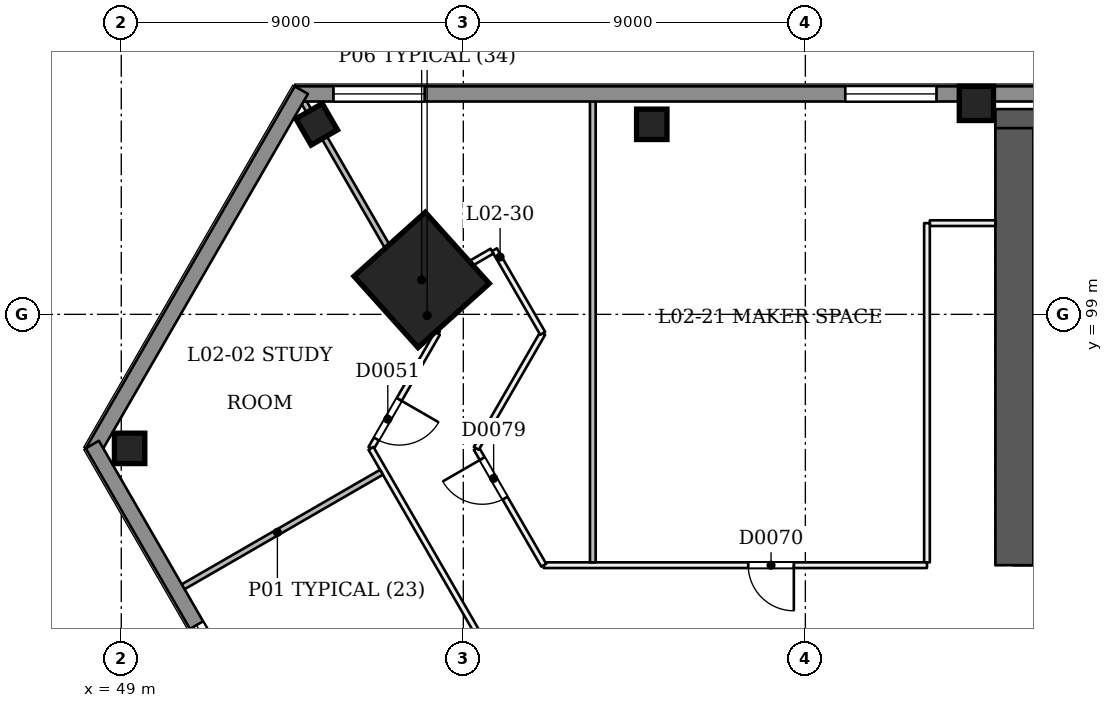
"""IFC4 building model, lengths in metres.
Left out: names, types, materials, properties, quantities, classifications, styles, units other than length and angle.
Written with IfcOpenShell. Run it as: python <this file> out.ifc"""

import sys

from ifc_helpers import new_model, si_unit, direction, frame, frame_2d, origin, origin_2d, place, context, subcontext, project, spatial, rectangle, extrude, element, fill, save


model = new_model("IFC4")
c1 = context("Model", 3, precision=1e-05, world=origin(), true_north=direction((0.0, 1.0)))
c2 = subcontext(c1, "Body", "Model", "MODEL_VIEW")
j1 = project(units=[si_unit("LENGTHUNIT", "METRE"), si_unit("PLANEANGLEUNIT", "RADIAN")], contexts=[c1])
p1 = place(None, origin())
s1 = spatial("IfcSite", under=j1, at=p1, CompositionType="ELEMENT")
p2 = place(p1, origin())
s2 = spatial("IfcBuilding", under=s1, at=p2, CompositionType="ELEMENT")
p3 = place(p2, frame((0.0, 0.0, 13.5)))
s3 = spatial("IfcBuildingStorey", under=s2, at=p3, CompositionType="ELEMENT", Elevation=13.5)
p4 = place(p3, frame((72.5, 92.9, 0.0), z_axis=(0.0, 0.0, 1.0), x_axis=(1.0, 0.0, 0.0)))
e1 = element("IfcWall", 1, at=p4, inside=s3, PredefinedType="SHEAR", context=c2, shape_type="SweptSolid", body=[
    extrude(rectangle(XDim=25.5, YDim=1.0, at=frame_2d((12.75, 0.0))), origin(), (0.0, 0.0, 1.0), 4.5),
])
p5 = place(p4, frame((1.3, 0.0, 0.0)))
e2 = element("IfcOpeningElement", 2, at=p5, cuts=e1, PredefinedType="OPENING", context=c2, shape_type="SweptSolid", body=[
    extrude(rectangle(XDim=1.2, YDim=2.1, at=frame_2d((0.6, 1.05))), frame((0.0, 0.51, 0.0), z_axis=(0.0, -1.0, 0.0), x_axis=(1.0, 0.0, 0.0)), (0.0, 0.0, 1.0), 1.021),
])
p6 = place(p4, frame((3.5, 0.0, 0.0)))
e3 = element("IfcOpeningElement", 3, at=p6, cuts=e1, PredefinedType="OPENING", context=c2, shape_type="SweptSolid", body=[
    extrude(rectangle(XDim=1.2, YDim=2.1, at=frame_2d((0.6, 1.05))), frame((0.0, 0.51, 0.0), z_axis=(0.0, -1.0, 0.0), x_axis=(1.0, 0.0, 0.0)), (0.0, 0.0, 1.0), 1.021),
])
p7 = place(p4, frame((13.5, 0.0, 0.0)))
e4 = element("IfcOpeningElement", 4, at=p7, cuts=e1, PredefinedType="OPENING", context=c2, shape_type="SweptSolid", body=[
    extrude(rectangle(XDim=1.2, YDim=2.1, at=frame_2d((0.6, 1.05))), frame((0.0, 0.51, 0.0), z_axis=(0.0, -1.0, 0.0), x_axis=(1.0, 0.0, 0.0)), (0.0, 0.0, 1.0), 1.021),
])
p8 = place(p4, frame((16.163, 0.0, 0.0)))
e5 = element("IfcOpeningElement", 5, at=p8, cuts=e1, PredefinedType="OPENING", context=c2, shape_type="SweptSolid", body=[
    extrude(rectangle(XDim=1.0, YDim=2.1, at=frame_2d((0.5, 1.05))), frame((0.0, 0.51, 0.0), z_axis=(0.0, -1.0, 0.0), x_axis=(1.0, 0.0, 0.0)), (0.0, 0.0, 1.0), 1.021),
])
p9 = place(p4, frame((18.95, 0.0, 0.0)))
e6 = element("IfcOpeningElement", 6, at=p9, cuts=e1, PredefinedType="OPENING", context=c2, shape_type="SweptSolid", body=[
    extrude(rectangle(XDim=1.0, YDim=2.1, at=frame_2d((0.5, 1.05))), frame((0.0, 0.51, 0.0), z_axis=(0.0, -1.0, 0.0), x_axis=(1.0, 0.0, 0.0)), (0.0, 0.0, 1.0), 1.021),
])
p10 = place(p4, frame((22.137, 0.0, 0.0)))
e7 = element("IfcOpeningElement", 7, at=p10, cuts=e1, PredefinedType="OPENING", context=c2, shape_type="SweptSolid", body=[
    extrude(rectangle(XDim=1.0, YDim=2.1, at=frame_2d((0.5, 1.05))), frame((0.0, 0.51, 0.0), z_axis=(0.0, -1.0, 0.0), x_axis=(1.0, 0.0, 0.0)), (0.0, 0.0, 1.0), 1.021),
])
p11 = place(p3, frame((97.5, 103.9, 0.0), z_axis=(0.0, 0.0, 1.0), x_axis=(-1.0, 0.0, 0.0)))
e8 = element("IfcWall", 8, at=p11, inside=s3, PredefinedType="SHEAR", context=c2, shape_type="SweptSolid", body=[
    extrude(rectangle(XDim=25.5, YDim=1.0, at=frame_2d((12.75, 0.0))), origin(), (0.0, 0.0, 1.0), 4.5),
])
p12 = place(p3, frame((72.5, 103.9, 0.0), z_axis=(0.0, 0.0, 1.0), x_axis=(0.0, -1.0, 0.0)))
e9 = element("IfcWall", 9, at=p12, inside=s3, PredefinedType="SHEAR", context=c2, shape_type="SweptSolid", body=[
    extrude(rectangle(XDim=11.5, YDim=1.0, at=frame_2d((5.75, 0.0))), origin(), (0.0, 0.0, 1.0), 4.5),
])
p13 = place(p3, frame((56.869, 99.895, 0.0), z_axis=(0.028361930921, 0.009273212596, 0.999554705057), x_axis=(-0.866194817713, 0.499308230352, 0.01994564791)))
e10 = element("IfcColumn", 10, at=p13, inside=s3, PredefinedType="COLUMN", context=c2, shape_type="SweptSolid", body=[
    extrude(rectangle(XDim=2.52, YDim=2.52, at=origin_2d()), origin(), (0.0, 0.0, 1.0), 4.502),
])
p14 = place(p3, frame((71.5, 104.55, 0.0), z_axis=(0.0, 0.0, 1.0), x_axis=(1.0, 0.0, 0.0)))
e11 = element("IfcColumn", 11, at=p14, inside=s3, PredefinedType="COLUMN", context=c2, shape_type="SweptSolid", body=[
    extrude(rectangle(XDim=0.9, YDim=0.9, at=origin_2d()), origin(), (0.0, 0.0, 1.0), 4.5),
])
for number, where, z_axis, x_axis in (
    (12, (62.959, 104.0, 0.0), (0.0, 0.0, 1.0), (1.0, 0.0, 0.0)),
    (13, (54.142, 104.0, 0.0), (0.0, 0.0, 1.0), (0.866, 0.5, 0.0)),
    (14, (49.219, 95.474, 0.0), (0.0, 0.0, 1.0), (1.0, 1.745e-08, 0.0)),
):
    element("IfcColumn", number, at=place(p3, frame(where, z_axis=z_axis, x_axis=x_axis)), inside=s3, PredefinedType="COLUMN", context=c2, shape_type="SweptSolid", body=[
        extrude(rectangle(XDim=0.8, YDim=0.8, at=origin_2d()), origin(), (0.0, 0.0, 1.0), 4.5),
    ])
p15 = place(p3, frame((56.778, 99.435, 0.0), z_axis=(0.0, 0.0, 1.0), x_axis=(0.500126914667, -0.865952117167, 0.0)))
e15 = element("IfcWall", 15, at=p15, inside=s3, PredefinedType="PARTITIONING", context=c2, shape_type="SweptSolid", body=[
    extrude(rectangle(XDim=1.08, YDim=0.15, at=frame_2d((0.54, 0.0))), origin(), (0.0, 0.0, 1.0), 4.05),
])
p16 = place(p3, frame((57.318, 98.5, 0.0), z_axis=(0.0, 0.0, 1.0), x_axis=(-0.500008701212, -0.866020380079, 0.0)))
e16 = element("IfcWall", 16, at=p16, inside=s3, PredefinedType="PARTITIONING", context=c2, shape_type="SweptSolid", body=[
    extrude(rectangle(XDim=3.495, YDim=0.15, at=frame_2d((1.747, 0.0))), origin(), (0.0, 0.0, 1.0), 4.05),
])
p17 = place(p16, frame((2.009, 0.0, 0.0)))
e17 = element("IfcOpeningElement", 17, at=p17, cuts=e16, PredefinedType="OPENING", context=c2, shape_type="SweptSolid", body=[
    extrude(rectangle(XDim=1.2, YDim=2.1, at=frame_2d((0.6, 1.05))), frame((0.0, 0.085, 0.0), z_axis=(0.0, -1.0, 0.0), x_axis=(1.0, 0.0, 0.0)), (0.0, 0.0, 1.0), 0.171),
])
p18 = place(p3, frame((55.57, 95.474, 0.0), z_axis=(0.0, 0.0, 1.0), x_axis=(0.500000085768, -0.866025354266, 0.0)))
e18 = element("IfcWall", 18, at=p18, inside=s3, PredefinedType="PARTITIONING", context=c2, shape_type="SweptSolid", body=[
    extrude(rectangle(XDim=55.365, YDim=0.15, at=frame_2d((27.682, 0.0))), origin(), (0.0, 0.0, 1.0), 4.05),
])
p19 = place(p18, frame((6.832, 0.0, 0.0)))
e19 = element("IfcOpeningElement", 19, at=p19, cuts=e18, PredefinedType="OPENING", context=c2, shape_type="SweptSolid", body=[
    extrude(rectangle(XDim=1.2, YDim=2.1, at=frame_2d((0.6, 1.05))), frame((0.0, 0.085, 0.0), z_axis=(0.0, -1.0, 0.0), x_axis=(1.0, 0.0, 0.0)), (0.0, 0.0, 1.0), 0.171),
])
p20 = place(p18, frame((14.626, 0.0, 0.0)))
e20 = element("IfcOpeningElement", 20, at=p20, cuts=e18, PredefinedType="OPENING", context=c2, shape_type="SweptSolid", body=[
    extrude(rectangle(XDim=0.9, YDim=2.1, at=frame_2d((0.45, 1.05))), frame((0.0, 0.085, 0.0), z_axis=(0.0, -1.0, 0.0), x_axis=(1.0, 0.0, 0.0)), (0.0, 0.0, 1.0), 0.171),
])
p21 = place(p18, frame((16.876, 0.0, 0.0)))
e21 = element("IfcOpeningElement", 21, at=p21, cuts=e18, PredefinedType="OPENING", context=c2, shape_type="SweptSolid", body=[
    extrude(rectangle(XDim=0.9, YDim=2.1, at=frame_2d((0.45, 1.05))), frame((0.0, 0.085, 0.0), z_axis=(0.0, -1.0, 0.0), x_axis=(1.0, 0.0, 0.0)), (0.0, 0.0, 1.0), 0.171),
])
p22 = place(p18, frame((24.832, 0.0, 0.0)))
e22 = element("IfcOpeningElement", 22, at=p22, cuts=e18, PredefinedType="OPENING", context=c2, shape_type="SweptSolid", body=[
    extrude(rectangle(XDim=1.2, YDim=2.1, at=frame_2d((0.6, 1.05))), frame((0.0, 0.085, 0.0), z_axis=(0.0, -1.0, 0.0), x_axis=(1.0, 0.0, 0.0)), (0.0, 0.0, 1.0), 0.171),
])
p23 = place(p18, frame((36.082, 0.0, 0.0)))
e23 = element("IfcOpeningElement", 23, at=p23, cuts=e18, PredefinedType="OPENING", context=c2, shape_type="SweptSolid", body=[
    extrude(rectangle(XDim=1.2, YDim=2.1, at=frame_2d((0.6, 1.05))), frame((0.0, 0.085, 0.0), z_axis=(0.0, -1.0, 0.0), x_axis=(1.0, 0.0, 0.0)), (0.0, 0.0, 1.0), 0.171),
])
p24 = place(p18, frame((45.082, 0.0, 0.0)))
e24 = element("IfcOpeningElement", 24, at=p24, cuts=e18, PredefinedType="OPENING", context=c2, shape_type="SweptSolid", body=[
    extrude(rectangle(XDim=1.2, YDim=2.1, at=frame_2d((0.6, 1.05))), frame((0.0, 0.085, 0.0), z_axis=(0.0, -1.0, 0.0), x_axis=(1.0, 0.0, 0.0)), (0.0, 0.0, 1.0), 0.171),
])
p25 = place(p18, frame((53.295, 0.0, 0.0)))
e25 = element("IfcOpeningElement", 25, at=p25, cuts=e18, PredefinedType="OPENING", context=c2, shape_type="SweptSolid", body=[
    extrude(rectangle(XDim=1.0, YDim=2.1, at=frame_2d((0.5, 1.05))), frame((0.0, 0.085, 0.0), z_axis=(0.0, -1.0, 0.0), x_axis=(1.0, 0.0, 0.0)), (0.0, 0.0, 1.0), 0.171),
])
p26 = place(p3, frame((72.0, 101.4, 0.0), z_axis=(0.0, 0.0, 1.0), x_axis=(-1.0, 0.0, 0.0)))
e26 = element("IfcWall", 26, at=p26, inside=s3, PredefinedType="PARTITIONING", context=c2, shape_type="SweptSolid", body=[
    extrude(rectangle(XDim=1.725, YDim=0.15, at=frame_2d((0.863, 0.0))), origin(), (0.0, 0.0, 1.0), 4.05),
])
p27 = place(p3, frame((70.2, 101.4, 0.0), z_axis=(0.0, 0.0, 1.0), x_axis=(0.0, -1.0, 0.0)))
e27 = element("IfcWall", 27, at=p27, inside=s3, PredefinedType="PARTITIONING", context=c2, shape_type="SweptSolid", body=[
    extrude(rectangle(XDim=8.925, YDim=0.15, at=frame_2d((4.462, 0.0))), origin(), (0.0, 0.0, 1.0), 4.05),
])
p28 = place(p3, frame((70.2, 92.4, 0.0), z_axis=(0.0, 0.0, 1.0), x_axis=(-1.0, 0.0, 0.0)))
e28 = element("IfcWall", 28, at=p28, inside=s3, PredefinedType="PARTITIONING", context=c2, shape_type="SweptSolid", body=[
    extrude(rectangle(XDim=10.084, YDim=0.15, at=frame_2d((5.042, 0.0))), origin(), (0.0, 0.0, 1.0), 4.05),
])
p29 = place(p28, frame((3.503, 0.0, 0.0)))
e29 = element("IfcOpeningElement", 29, at=p29, cuts=e28, PredefinedType="OPENING", context=c2, shape_type="SweptSolid", body=[
    extrude(rectangle(XDim=1.2, YDim=2.1, at=frame_2d((0.6, 1.05))), frame((0.0, 0.085, 0.0), z_axis=(0.0, -1.0, 0.0), x_axis=(1.0, 0.0, 0.0)), (0.0, 0.0, 1.0), 0.171),
])
p30 = place(p3, frame((60.116, 92.4, 0.0), z_axis=(0.0, 0.0, 1.0), x_axis=(-0.500008260065, 0.866020634781, 0.0)))
e30 = element("IfcWall", 30, at=p30, inside=s3, PredefinedType="PARTITIONING", context=c2, shape_type="SweptSolid", body=[
    extrude(rectangle(XDim=3.549, YDim=0.15, at=frame_2d((1.775, 0.0))), origin(), (0.0, 0.0, 1.0), 4.05),
])
p31 = place(p30, frame((2.037, 0.0, 0.0)))
e31 = element("IfcOpeningElement", 31, at=p31, cuts=e30, PredefinedType="OPENING", context=c2, shape_type="SweptSolid", body=[
    extrude(rectangle(XDim=1.2, YDim=2.1, at=frame_2d((0.6, 1.05))), frame((0.0, 0.085, 0.0), z_axis=(0.0, -1.0, 0.0), x_axis=(1.0, 0.0, 0.0)), (0.0, 0.0, 1.0), 0.171),
])
p32 = place(p3, frame((58.342, 95.474, 0.0), z_axis=(0.0, 0.0, 1.0), x_axis=(0.500008701212, 0.866020380079, 0.0)))
e32 = element("IfcWall", 32, at=p32, inside=s3, PredefinedType="PARTITIONING", context=c2, shape_type="SweptSolid", body=[
    extrude(rectangle(XDim=3.495, YDim=0.15, at=frame_2d((1.747, 0.0))), origin(), (0.0, 0.0, 1.0), 4.05),
])
p33 = place(p3, frame((60.089, 98.5, 0.0), z_axis=(0.0, 0.0, 1.0), x_axis=(-0.500035802948, 0.866004731956, 0.0)))
e33 = element("IfcWall", 33, at=p33, inside=s3, PredefinedType="PARTITIONING", context=c2, shape_type="SweptSolid", body=[
    extrude(rectangle(XDim=2.54, YDim=0.15, at=frame_2d((1.27, 0.0))), origin(), (0.0, 0.0, 1.0), 4.05),
])
p34 = place(p3, frame((58.754, 100.663, 0.0), z_axis=(0.0, 0.0, 1.0), x_axis=(-0.866017533419, -0.500013631625, 0.0)))
e34 = element("IfcWall", 34, at=p34, inside=s3, PredefinedType="PARTITIONING", context=c2, shape_type="SweptSolid", body=[
    extrude(rectangle(XDim=2.25, YDim=0.15, at=frame_2d((1.125, 0.0))), origin(), (0.0, 0.0, 1.0), 4.05),
])
p35 = place(p3, frame((50.369, 91.683, 0.0), z_axis=(0.0, 0.0, 1.0), x_axis=(0.866025537322, 0.499999768706, 0.0)))
e35 = element("IfcWall", 35, at=p35, inside=s3, PredefinedType="PARTITIONING", context=c2, shape_type="SweptSolid", body=[
    extrude(rectangle(XDim=6.325, YDim=0.15, at=frame_2d((3.163, 0.0))), origin(), (0.0, 0.0, 1.0), 4.05),
])
p36 = place(p3, frame((56.74, 99.5, 0.0), z_axis=(0.0, 0.0, 1.0), x_axis=(-0.500004896655, 0.866022576681, 0.0)))
e36 = element("IfcWall", 36, at=p36, inside=s3, PredefinedType="PARTITIONING", context=c2, shape_type="SweptSolid", body=[
    extrude(rectangle(XDim=6.235, YDim=0.15, at=frame_2d((3.118, 0.0))), origin(), (0.0, 0.0, 1.0), 4.05),
])
p37 = place(p3, frame((61.408, 104.9, 0.0), z_axis=(0.0, 0.0, 1.0), x_axis=(0.0, -1.0, 0.0)))
e37 = element("IfcWall", 37, at=p37, inside=s3, PredefinedType="PARTITIONING", context=c2, shape_type="SweptSolid", body=[
    extrude(rectangle(XDim=12.425, YDim=0.15, at=frame_2d((6.212, 0.0))), origin(), (0.0, 0.0, 1.0), 4.05),
])
p38 = place(p3, frame((53.565, 104.8, 0.0), z_axis=(0.0, 0.0, 1.0), x_axis=(1.0, 0.0, 0.0)))
e38 = element("IfcWall", 38, at=p38, inside=s3, PredefinedType="SOLIDWALL", context=c2, shape_type="SweptSolid", body=[
    extrude(rectangle(XDim=62.871, YDim=0.4, at=frame_2d((31.435, 0.0))), origin(), (0.0, 0.0, 1.0), 4.05),
])
p39 = place(p38, frame((59.452, 0.0, 0.9)))
e39 = element("IfcOpeningElement", 39, at=p39, cuts=e38, PredefinedType="OPENING", context=c2, shape_type="SweptSolid", body=[
    extrude(rectangle(XDim=2.4, YDim=1.5, at=frame_2d((1.2, 0.75))), frame((0.0, 0.21, 0.0), z_axis=(0.0, -1.0, 0.0), x_axis=(1.0, 0.0, 0.0)), (0.0, 0.0, 1.0), 0.421),
])
p40 = place(p38, frame((54.986, 0.0, 0.9)))
e40 = element("IfcOpeningElement", 40, at=p40, cuts=e38, PredefinedType="OPENING", context=c2, shape_type="SweptSolid", body=[
    extrude(rectangle(XDim=2.4, YDim=1.5, at=frame_2d((1.2, 0.75))), frame((0.0, 0.21, 0.0), z_axis=(0.0, -1.0, 0.0), x_axis=(1.0, 0.0, 0.0)), (0.0, 0.0, 1.0), 0.421),
])
p41 = place(p38, frame((45.986, 0.0, 0.9)))
e41 = element("IfcOpeningElement", 41, at=p41, cuts=e38, PredefinedType="OPENING", context=c2, shape_type="SweptSolid", body=[
    extrude(rectangle(XDim=2.4, YDim=1.5, at=frame_2d((1.2, 0.75))), frame((0.0, 0.21, 0.0), z_axis=(0.0, -1.0, 0.0), x_axis=(1.0, 0.0, 0.0)), (0.0, 0.0, 1.0), 0.421),
])
p42 = place(p38, frame((14.486, 0.0, 0.9)))
e42 = element("IfcOpeningElement", 42, at=p42, cuts=e38, PredefinedType="OPENING", context=c2, shape_type="SweptSolid", body=[
    extrude(rectangle(XDim=2.4, YDim=1.5, at=frame_2d((1.2, 0.75))), frame((0.0, 0.21, 0.0), z_axis=(0.0, -1.0, 0.0), x_axis=(1.0, 0.0, 0.0)), (0.0, 0.0, 1.0), 0.421),
])
p43 = place(p38, frame((1.018, 0.0, 0.9)))
e43 = element("IfcOpeningElement", 43, at=p43, cuts=e38, PredefinedType="OPENING", context=c2, shape_type="SweptSolid", body=[
    extrude(rectangle(XDim=2.4, YDim=1.5, at=frame_2d((1.2, 0.75))), frame((0.0, 0.21, 0.0), z_axis=(0.0, -1.0, 0.0), x_axis=(1.0, 0.0, 0.0)), (0.0, 0.0, 1.0), 0.421),
])
p44 = place(p3, frame((48.238, 95.374, 0.0), z_axis=(0.0, 0.0, 1.0), x_axis=(0.50000615651, 0.866021849293, 0.0)))
e44 = element("IfcWall", 44, at=p44, inside=s3, PredefinedType="SOLIDWALL", context=c2, shape_type="SweptSolid", body=[
    extrude(rectangle(XDim=11.0, YDim=0.4, at=frame_2d((5.5, 0.0))), origin(), (0.0, 0.0, 1.0), 4.05),
])
p45 = place(p3, frame((79.673, 41.126, 0.0), z_axis=(0.0, 0.0, 1.0), x_axis=(-0.499997306052, 0.866026959131, 0.0)))
e45 = element("IfcWall", 45, at=p45, inside=s3, PredefinedType="SOLIDWALL", context=c2, shape_type="SweptSolid", body=[
    extrude(rectangle(XDim=62.87, YDim=0.4, at=frame_2d((31.435, 0.0))), origin(), (0.0, 0.0, 1.0), 4.05),
])
p46 = place(p45, frame((54.986, 0.0, 0.9)))
e46 = element("IfcOpeningElement", 46, at=p46, cuts=e45, PredefinedType="OPENING", context=c2, shape_type="SweptSolid", body=[
    extrude(rectangle(XDim=2.4, YDim=1.5, at=frame_2d((1.2, 0.75))), frame((0.0, 0.21, 0.0), z_axis=(0.0, -1.0, 0.0), x_axis=(1.0, 0.0, 0.0)), (0.0, 0.0, 1.0), 0.421),
])
p47 = place(p45, frame((50.486, 0.0, 0.9)))
e47 = element("IfcOpeningElement", 47, at=p47, cuts=e45, PredefinedType="OPENING", context=c2, shape_type="SweptSolid", body=[
    extrude(rectangle(XDim=2.4, YDim=1.5, at=frame_2d((1.2, 0.75))), frame((0.0, 0.21, 0.0), z_axis=(0.0, -1.0, 0.0), x_axis=(1.0, 0.0, 0.0)), (0.0, 0.0, 1.0), 0.421),
])
p48 = place(p45, frame((45.986, 0.0, 0.9)))
e48 = element("IfcOpeningElement", 48, at=p48, cuts=e45, PredefinedType="OPENING", context=c2, shape_type="SweptSolid", body=[
    extrude(rectangle(XDim=2.4, YDim=1.5, at=frame_2d((1.2, 0.75))), frame((0.0, 0.21, 0.0), z_axis=(0.0, -1.0, 0.0), x_axis=(1.0, 0.0, 0.0)), (0.0, 0.0, 1.0), 0.421),
])
p49 = place(p45, frame((32.486, 0.0, 0.9)))
e49 = element("IfcOpeningElement", 49, at=p49, cuts=e45, PredefinedType="OPENING", context=c2, shape_type="SweptSolid", body=[
    extrude(rectangle(XDim=2.4, YDim=1.5, at=frame_2d((1.2, 0.75))), frame((0.0, 0.21, 0.0), z_axis=(0.0, -1.0, 0.0), x_axis=(1.0, 0.0, 0.0)), (0.0, 0.0, 1.0), 0.421),
])
p50 = place(p45, frame((27.986, 0.0, 0.9)))
e50 = element("IfcOpeningElement", 50, at=p50, cuts=e45, PredefinedType="OPENING", context=c2, shape_type="SweptSolid", body=[
    extrude(rectangle(XDim=2.4, YDim=1.5, at=frame_2d((1.2, 0.75))), frame((0.0, 0.21, 0.0), z_axis=(0.0, -1.0, 0.0), x_axis=(1.0, 0.0, 0.0)), (0.0, 0.0, 1.0), 0.421),
])
p51 = place(p45, frame((23.486, 0.0, 0.9)))
e51 = element("IfcOpeningElement", 51, at=p51, cuts=e45, PredefinedType="OPENING", context=c2, shape_type="SweptSolid", body=[
    extrude(rectangle(XDim=2.4, YDim=1.5, at=frame_2d((1.2, 0.75))), frame((0.0, 0.21, 0.0), z_axis=(0.0, -1.0, 0.0), x_axis=(1.0, 0.0, 0.0)), (0.0, 0.0, 1.0), 0.421),
])
p52 = place(p45, frame((18.986, 0.0, 0.9)))
e52 = element("IfcOpeningElement", 52, at=p52, cuts=e45, PredefinedType="OPENING", context=c2, shape_type="SweptSolid", body=[
    extrude(rectangle(XDim=2.4, YDim=1.5, at=frame_2d((1.2, 0.75))), frame((0.0, 0.21, 0.0), z_axis=(0.0, -1.0, 0.0), x_axis=(1.0, 0.0, 0.0)), (0.0, 0.0, 1.0), 0.421),
])
p53 = place(p45, frame((14.486, 0.0, 0.9)))
e53 = element("IfcOpeningElement", 53, at=p53, cuts=e45, PredefinedType="OPENING", context=c2, shape_type="SweptSolid", body=[
    extrude(rectangle(XDim=2.4, YDim=1.5, at=frame_2d((1.2, 0.75))), frame((0.0, 0.21, 0.0), z_axis=(0.0, -1.0, 0.0), x_axis=(1.0, 0.0, 0.0)), (0.0, 0.0, 1.0), 0.421),
])
p54 = place(p17, origin())
e54 = element("IfcDoor", 54, at=p54, inside=s3, OperationType="SINGLE_SWING_LEFT", PredefinedType="NOTDEFINED", context=c2, shape_type="SweptSolid", body=[
    extrude(rectangle(XDim=1.2, YDim=2.1, at=frame_2d((0.6, 1.05))), frame((0.0, 0.025, 0.0), z_axis=(0.0, -1.0, 0.0), x_axis=(1.0, 0.0, 0.0)), (0.0, 0.0, 1.0), 0.05),
])
fill(e17, e54)
p55 = place(p29, origin())
e55 = element("IfcDoor", 55, at=p55, inside=s3, OperationType="SINGLE_SWING_LEFT", PredefinedType="NOTDEFINED", context=c2, shape_type="SweptSolid", body=[
    extrude(rectangle(XDim=1.2, YDim=2.1, at=frame_2d((0.6, 1.05))), frame((0.0, 0.025, 0.0), z_axis=(0.0, -1.0, 0.0), x_axis=(1.0, 0.0, 0.0)), (0.0, 0.0, 1.0), 0.05),
])
fill(e29, e55)
p56 = place(p31, origin())
e56 = element("IfcDoor", 56, at=p56, inside=s3, OperationType="SINGLE_SWING_RIGHT", PredefinedType="NOTDEFINED", context=c2, shape_type="SweptSolid", body=[
    extrude(rectangle(XDim=1.2, YDim=2.1, at=frame_2d((0.6, 1.05))), frame((0.0, 0.025, 0.0), z_axis=(0.0, -1.0, 0.0), x_axis=(1.0, 0.0, 0.0)), (0.0, 0.0, 1.0), 0.05),
])
fill(e31, e56)
p57 = place(p42, origin())
e57 = element("IfcWindow", 57, at=p57, inside=s3, PartitioningType="SINGLE_PANEL", PredefinedType="WINDOW", context=c2, shape_type="SweptSolid", body=[
    extrude(rectangle(XDim=2.4, YDim=1.5, at=frame_2d((1.2, 0.75))), frame((0.0, 0.03, 0.0), z_axis=(0.0, -1.0, 0.0), x_axis=(1.0, 0.0, 0.0)), (0.0, 0.0, 1.0), 0.06),
])
fill(e42, e57)
p58 = place(p43, origin())
e58 = element("IfcWindow", 58, at=p58, inside=s3, PartitioningType="SINGLE_PANEL", PredefinedType="WINDOW", context=c2, shape_type="SweptSolid", body=[
    extrude(rectangle(XDim=2.4, YDim=1.5, at=frame_2d((1.2, 0.75))), frame((0.0, 0.03, 0.0), z_axis=(0.0, -1.0, 0.0), x_axis=(1.0, 0.0, 0.0)), (0.0, 0.0, 1.0), 0.06),
])
fill(e43, e58)
p59 = place(p46, origin())
e59 = element("IfcWindow", 59, at=p59, inside=s3, PartitioningType="SINGLE_PANEL", PredefinedType="WINDOW", context=c2, shape_type="SweptSolid", body=[
    extrude(rectangle(XDim=2.4, YDim=1.5, at=frame_2d((1.2, 0.75))), frame((0.0, 0.03, 0.0), z_axis=(0.0, -1.0, 0.0), x_axis=(1.0, 0.0, 0.0)), (0.0, 0.0, 1.0), 0.06),
])
fill(e46, e59)
save(model, sys.argv[1])
